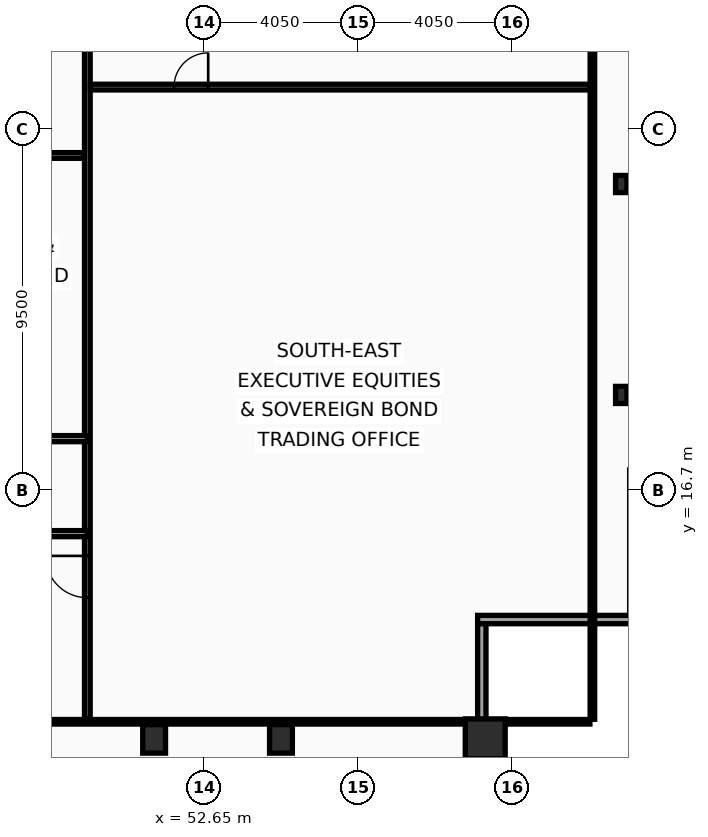
"""IFC4 building model, lengths in metres.
Left out: names, types, materials, properties, quantities, classifications, styles, units other than length and angle.
Written with IfcOpenShell. Run it as: python <this file> out.ifc"""

import sys

from ifc_helpers import new_model, si_unit, direction, frame, frame_2d, origin, origin_2d, place, context, subcontext, project, spatial, rectangle, hollow_rectangle, i_section, extrude, element, fill, save


model = new_model("IFC4")
c1 = context("Model", 3, precision=1e-05, world=origin(), true_north=direction((0.0, 1.0)))
c2 = subcontext(c1, "Body", "Model", "MODEL_VIEW")
j1 = project(units=[si_unit("LENGTHUNIT", "METRE"), si_unit("PLANEANGLEUNIT", "RADIAN")], contexts=[c1])
p1 = place(None, origin())
s1 = spatial("IfcSite", under=j1, at=p1, CompositionType="ELEMENT")
p2 = place(p1, origin())
s2 = spatial("IfcBuilding", under=s1, at=p2, CompositionType="ELEMENT")
p3 = place(p2, frame((0.0, 0.0, 277.0)))
s3 = spatial("IfcBuildingStorey", under=s2, at=p3, CompositionType="ELEMENT", Elevation=277.0)
p4 = place(p3, frame((60.05, 10.15, 0.0), z_axis=(0.0, 0.0, 1.0), x_axis=(1.0, 0.0, 0.0)))
e1 = element("IfcColumn", 1, at=p4, inside=s3, PredefinedType="COLUMN", context=c2, shape_type="SweptSolid", body=[
    extrude(hollow_rectangle(XDim=1.05, YDim=1.05, WallThickness=0.055, at=origin_2d()), origin(), (0.0, 0.0, 1.0), 3.6),
])
for number, where, z_axis, x_axis in (
    (2, (51.337, 10.15, 0.0), (0.0, 0.0, 1.0), (1.0, 0.0, 0.0)),
    (3, (54.675, 10.15, 0.0), (0.0, 0.0, 1.0), (1.0, 0.0, 0.0)),
):
    element("IfcColumn", number, at=place(p3, frame(where, z_axis=z_axis, x_axis=x_axis)), inside=s3, PredefinedType="COLUMN", context=c2, shape_type="SweptSolid", body=[
        extrude(hollow_rectangle(XDim=0.6, YDim=0.75, WallThickness=0.045, at=origin_2d()), origin(), (0.0, 0.0, 1.0), 3.6),
    ])
for number, where, z_axis, x_axis in (
    (4, (63.63, 19.2, 0.0), (0.0, 0.0, 1.0), (1.0, 0.0, 0.0)),
    (5, (63.63, 24.75, 0.0), (0.0, 0.0, 1.0), (1.0, 0.0, 0.0)),
):
    element("IfcColumn", number, at=place(p3, frame(where, z_axis=z_axis, x_axis=x_axis)), inside=s3, PredefinedType="COLUMN", context=c2, shape_type="SweptSolid", body=[
        extrude(i_section(OverallWidth=0.3, OverallDepth=0.45, WebThickness=0.014, FlangeThickness=0.026, at=origin_2d()), origin(), (0.0, 0.0, 1.0), 3.6),
    ])
p5 = place(p3, frame((64.07, 13.29, 0.0), z_axis=(0.0, 0.0, 1.0), x_axis=(-1.0, 0.0, 0.0)))
e6 = element("IfcWall", 6, at=p5, inside=s3, PredefinedType="SOLIDWALL", context=c2, shape_type="SweptSolid", body=[
    extrude(rectangle(XDim=4.22, YDim=0.22, at=frame_2d((2.11, 0.0))), origin(), (0.0, 0.0, 1.0), 2.88),
])
p6 = place(p3, frame((59.96, 13.18, 0.0), z_axis=(0.0, 0.0, 1.0), x_axis=(0.0, -1.0, 0.0)))
e7 = element("IfcWall", 7, at=p6, inside=s3, PredefinedType="SOLIDWALL", context=c2, shape_type="SweptSolid", body=[
    extrude(rectangle(XDim=3.91, YDim=0.22, at=frame_2d((1.955, 0.0))), origin(), (0.0, 0.0, 1.0), 2.88),
])
p7 = place(p3, frame((49.58, 10.665, 0.0), z_axis=(0.0, 0.0, 1.0), x_axis=(0.0, 1.0, 0.0)))
e8 = element("IfcWall", 8, at=p7, inside=s3, PredefinedType="PARTITIONING", context=c2, shape_type="SweptSolid", body=[
    extrude(rectangle(XDim=24.955, YDim=0.15, at=frame_2d((12.478, 0.0))), origin(), (0.0, 0.0, 1.0), 3.03),
])
p8 = place(p7, frame((3.2, 0.0, 0.0)))
e9 = element("IfcOpeningElement", 9, at=p8, cuts=e8, PredefinedType="OPENING", context=c2, shape_type="SweptSolid", body=[
    extrude(rectangle(XDim=1.1, YDim=2.1, at=frame_2d((0.55, 1.05))), frame((0.0, 0.085, 0.0), z_axis=(0.0, -1.0, 0.0), x_axis=(1.0, 0.0, 0.0)), (0.0, 0.0, 1.0), 0.17),
])
p9 = place(p3, frame((49.66, 27.3, 0.0), z_axis=(0.0, 0.0, 1.0), x_axis=(1.0, 0.0, 0.0)))
e10 = element("IfcWall", 10, at=p9, inside=s3, PredefinedType="PARTITIONING", context=c2, shape_type="SweptSolid", body=[
    extrude(rectangle(XDim=13.145, YDim=0.15, at=frame_2d((6.573, 0.0))), origin(), (0.0, 0.0, 1.0), 2.78),
])
p10 = place(p9, frame((2.2, 0.0, 0.0)))
e11 = element("IfcOpeningElement", 11, at=p10, cuts=e10, PredefinedType="OPENING", context=c2, shape_type="SweptSolid", body=[
    extrude(rectangle(XDim=0.9, YDim=2.05, at=frame_2d((0.45, 1.025))), frame((0.0, 0.085, 0.0), z_axis=(0.0, -1.0, 0.0), x_axis=(1.0, 0.0, 0.0)), (0.0, 0.0, 1.0), 0.17),
])
p11 = place(p3, frame((43.956, 18.05, 0.0), z_axis=(0.0, 0.0, 1.0), x_axis=(1.0, 0.0, 0.0)))
e12 = element("IfcWall", 12, at=p11, inside=s3, PredefinedType="PARTITIONING", context=c2, shape_type="SweptSolid", body=[
    extrude(rectangle(XDim=5.624, YDim=0.16, at=frame_2d((2.812, 0.0))), origin(), (0.0, 0.0, 1.0), 2.78),
])
p12 = place(p11, frame((2.612, 0.0, 0.0)))
e13 = element("IfcOpeningElement", 13, at=p12, cuts=e12, PredefinedType="OPENING", context=c2, shape_type="SweptSolid", body=[
    extrude(rectangle(XDim=1.0, YDim=2.05, at=frame_2d((0.5, 1.025))), frame((0.0, 0.09, 0.0), z_axis=(0.0, -1.0, 0.0), x_axis=(1.0, 0.0, 0.0)), (0.0, 0.0, 1.0), 0.18),
])
p13 = place(p3, frame((44.036, 25.501, 0.0), z_axis=(0.0, 0.0, 1.0), x_axis=(1.0, 0.0, 0.0)))
e14 = element("IfcWall", 14, at=p13, inside=s3, PredefinedType="PARTITIONING", context=c2, shape_type="SweptSolid", body=[
    extrude(rectangle(XDim=5.464, YDim=0.15, at=frame_2d((2.732, 0.0))), origin(), (0.0, 0.0, 1.0), 2.78),
])
p14 = place(p13, frame((2.531, 0.0, 0.0)))
e15 = element("IfcOpeningElement", 15, at=p14, cuts=e14, PredefinedType="OPENING", context=c2, shape_type="SweptSolid", body=[
    extrude(rectangle(XDim=0.9, YDim=2.05, at=frame_2d((0.45, 1.025))), frame((0.0, 0.085, 0.0), z_axis=(0.0, -1.0, 0.0), x_axis=(1.0, 0.0, 0.0)), (0.0, 0.0, 1.0), 0.17),
])
p15 = place(p3, frame((36.532, 15.55, 0.0), z_axis=(0.0, 0.0, 1.0), x_axis=(1.0, 0.0, 0.0)))
e16 = element("IfcWall", 16, at=p15, inside=s3, PredefinedType="PARTITIONING", context=c2, shape_type="SweptSolid", body=[
    extrude(rectangle(XDim=13.048, YDim=0.16, at=frame_2d((6.524, 0.0))), origin(), (0.0, 0.0, 1.0), 2.78),
])
p16 = place(p15, frame((5.73, 0.0, 0.0)))
e17 = element("IfcOpeningElement", 17, at=p16, cuts=e16, PredefinedType="OPENING", context=c2, shape_type="SweptSolid", body=[
    extrude(rectangle(XDim=1.0, YDim=2.05, at=frame_2d((0.5, 1.025))), frame((0.0, 0.09, 0.0), z_axis=(0.0, -1.0, 0.0), x_axis=(1.0, 0.0, 0.0)), (0.0, 0.0, 1.0), 0.18),
])
p17 = place(p3, frame((62.87, 10.665, 0.0), z_axis=(0.0, 0.0, 1.0), x_axis=(0.0, 1.0, 0.0)))
e18 = element("IfcWall", 18, at=p17, inside=s3, PredefinedType="PARTITIONING", context=c2, shape_type="SweptSolid", body=[
    extrude(rectangle(XDim=42.11, YDim=0.12, at=frame_2d((21.055, 0.0))), origin(), (0.0, 0.0, 1.0), 2.78),
])
p18 = place(p3, frame((10.095, 10.6, 0.0), z_axis=(0.0, 0.0, 1.0), x_axis=(1.0, 0.0, 0.0)))
e19 = element("IfcWall", 19, at=p18, inside=s3, PredefinedType="PARTITIONING", context=c2, shape_type="SweptSolid", body=[
    extrude(rectangle(XDim=52.71, YDim=0.12, at=frame_2d((26.355, 0.0))), origin(), (0.0, 0.0, 1.0), 2.78),
])
p19 = place(p8, origin())
e20 = element("IfcDoor", 20, at=p19, inside=s3, OperationType="SINGLE_SWING_RIGHT", PredefinedType="DOOR", context=c2, shape_type="SweptSolid", body=[
    extrude(rectangle(XDim=1.1, YDim=2.1, at=frame_2d((0.55, 1.05))), frame((0.0, 0.025, 0.0), z_axis=(0.0, -1.0, 0.0), x_axis=(1.0, 0.0, 0.0)), (0.0, 0.0, 1.0), 0.05),
])
fill(e9, e20)
p20 = place(p10, origin())
e21 = element("IfcDoor", 21, at=p20, inside=s3, OperationType="SINGLE_SWING_RIGHT", PredefinedType="DOOR", context=c2, shape_type="SweptSolid", body=[
    extrude(rectangle(XDim=0.9, YDim=2.05, at=frame_2d((0.45, 1.025))), frame((0.0, 0.025, 0.0), z_axis=(0.0, -1.0, 0.0), x_axis=(1.0, 0.0, 0.0)), (0.0, 0.0, 1.0), 0.05),
])
fill(e11, e21)
save(model, sys.argv[1])
